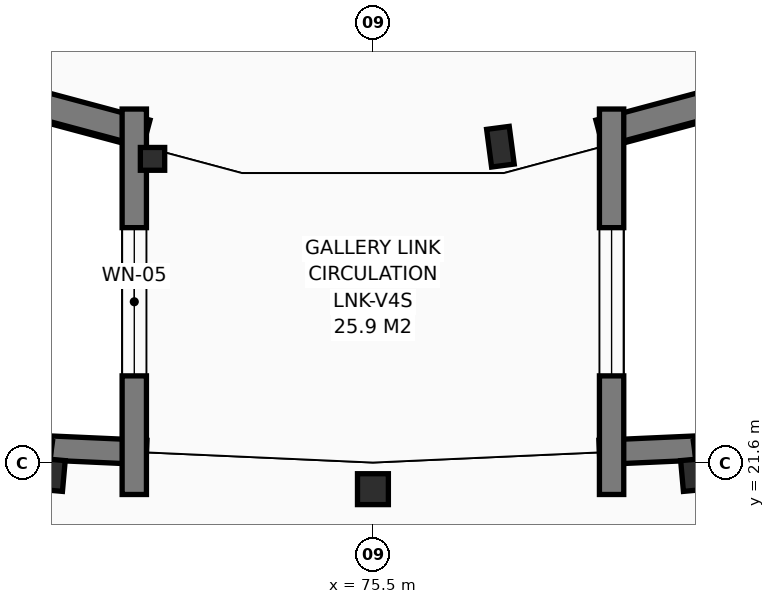
"""IFC4 building model, lengths in metres.
Left out: names, types, materials, properties, quantities, classifications, styles, units other than length and angle.
Written with IfcOpenShell. Run it as: python <this file> out.ifc"""

import sys

from ifc_helpers import new_model, si_unit, direction, frame, frame_2d, origin, origin_2d, place, context, subcontext, project, spatial, rectangle, hollow_circle, i_section, extrude, element, fill, save


model = new_model("IFC4")
c1 = context("Model", 3, precision=1e-05, world=origin(), true_north=direction((0.0, 1.0)))
c2 = subcontext(c1, "Body", "Model", "MODEL_VIEW")
j1 = project(units=[si_unit("LENGTHUNIT", "METRE"), si_unit("PLANEANGLEUNIT", "RADIAN")], contexts=[c1])
p1 = place(None, origin())
s1 = spatial("IfcSite", under=j1, at=p1, CompositionType="ELEMENT")
p2 = place(p1, origin())
s2 = spatial("IfcBuilding", under=s1, at=p2, CompositionType="ELEMENT")
p3 = place(p2, origin())
s3 = spatial("IfcBuildingStorey", under=s2, at=p3, CompositionType="ELEMENT", Elevation=0.0)
for number, where, z_axis, x_axis in (
    (1, (71.231, 21.446, 0.0), (0.0, 0.0, 1.0), (0.089, 0.996, 0.0)),
    (2, (75.5, 21.255, 0.0), (0.0, 0.0, 1.0), (0.0, 1.0, 0.0)),
    (3, (79.769, 21.446, 0.0), (0.0, 0.0, 1.0), (-0.089, 0.996, 0.0)),
):
    element("IfcColumn", number, at=place(p3, frame(where, z_axis=z_axis, x_axis=x_axis)), inside=s3, PredefinedType="COLUMN", context=c2, shape_type="SweptSolid", body=[
        extrude(hollow_circle(Radius=0.203, WallThickness=0.02, at=origin_2d()), origin(), (0.0, 0.0, 1.0), 5.1),
    ])
p4 = place(p3, frame((77.177, 25.76, 0.0), z_axis=(0.0, 0.0, 1.0), x_axis=(0.13052619222, -0.991444861374, 0.0)))
e4 = element("IfcColumn", 4, at=p4, inside=s3, PredefinedType="COLUMN", context=c2, shape_type="SweptSolid", body=[
    extrude(i_section(OverallWidth=0.3, OverallDepth=0.5, WebThickness=0.014, FlangeThickness=0.028, FilletRadius=0.027, at=origin_2d()), origin(), (0.0, 0.0, 1.0), 5.1),
])
p5 = place(p3, frame((72.6, 25.6, 0.0), z_axis=(0.0, 0.0, 1.0), x_axis=(1.0, 0.0, 0.0)))
e5 = element("IfcColumn", 5, at=p5, inside=s3, PredefinedType="COLUMN", context=c2, shape_type="SweptSolid", body=[
    extrude(i_section(OverallWidth=0.3, OverallDepth=0.32, WebThickness=0.011, FlangeThickness=0.021, FilletRadius=0.027, at=origin_2d()), origin(), (0.0, 0.0, 1.0), 5.1),
])
for number, where, z_axis, x_axis in (
    (6, (71.262, 21.794, 0.0), (0.0, 0.0, 1.0), (0.999, -0.045, 0.0)),
    (7, (78.48, 21.738, 0.0), (0.0, 0.0, 1.0), (0.999, 0.045, 0.0)),
):
    element("IfcWall", number, at=place(p3, frame(where, z_axis=z_axis, x_axis=x_axis)), inside=s3, PredefinedType="SOLIDWALL", context=c2, shape_type="SweptSolid", body=[
        extrude(rectangle(XDim=1.259, YDim=0.32, at=frame_2d((0.63, 0.0))), origin(), (0.0, 0.0, 1.0), 4.88),
    ])
p6 = place(p3, frame((80.656, 26.519, 0.0), z_axis=(0.0, 0.0, 1.0), x_axis=(-0.965924829222, -0.258822766178, 0.0)))
e8 = element("IfcWall", 8, at=p6, inside=s3, PredefinedType="SOLIDWALL", context=c2, shape_type="SweptSolid", body=[
    extrude(rectangle(XDim=2.252, YDim=0.36, at=frame_2d((1.126, 0.0))), origin(), (0.0, 0.0, 1.0), 4.88),
])
p7 = place(p3, frame((72.52, 25.936, 0.0), z_axis=(0.0, 0.0, 1.0), x_axis=(-0.965931226398, 0.25879889078, 0.0)))
e9 = element("IfcWall", 9, at=p7, inside=s3, PredefinedType="SOLIDWALL", context=c2, shape_type="SweptSolid", body=[
    extrude(rectangle(XDim=2.073, YDim=0.36, at=frame_2d((1.036, 0.0))), origin(), (0.0, 0.0, 1.0), 4.88),
])
p8 = place(p3, frame((72.36, 21.185, 0.0), z_axis=(0.0, 0.0, 1.0), x_axis=(0.0, 1.0, 0.0)))
e10 = element("IfcWall", 10, at=p8, inside=s3, PredefinedType="SOLIDWALL", context=c2, shape_type="SweptSolid", body=[
    extrude(rectangle(XDim=5.071, YDim=0.32, at=frame_2d((2.536, 0.0))), origin(), (0.0, 0.0, 1.0), 4.82),
])
p9 = place(p8, frame((1.561, 0.0, 1.12)))
e11 = element("IfcOpeningElement", 11, at=p9, cuts=e10, PredefinedType="OPENING", context=c2, shape_type="SweptSolid", body=[
    extrude(rectangle(XDim=1.95, YDim=1.5, at=frame_2d((0.975, 0.75))), frame((0.0, 0.17, 0.0), z_axis=(0.0, -1.0, 0.0), x_axis=(1.0, 0.0, 0.0)), (0.0, 0.0, 1.0), 0.34),
])
p10 = place(p3, frame((78.64, 26.256, 0.0), z_axis=(0.0, 0.0, 1.0), x_axis=(0.0, -1.0, 0.0)))
e12 = element("IfcWall", 12, at=p10, inside=s3, PredefinedType="SOLIDWALL", context=c2, shape_type="SweptSolid", body=[
    extrude(rectangle(XDim=5.071, YDim=0.32, at=frame_2d((2.536, 0.0))), origin(), (0.0, 0.0, 1.0), 4.82),
])
p11 = place(p10, frame((1.561, 0.0, 1.12)))
e13 = element("IfcOpeningElement", 13, at=p11, cuts=e12, PredefinedType="OPENING", context=c2, shape_type="SweptSolid", body=[
    extrude(rectangle(XDim=1.95, YDim=1.5, at=frame_2d((0.975, 0.75))), frame((0.0, 0.17, 0.0), z_axis=(0.0, -1.0, 0.0), x_axis=(1.0, 0.0, 0.0)), (0.0, 0.0, 1.0), 0.34),
])
p12 = place(p9, origin())
e14 = element("IfcWindow", 14, at=p12, inside=s3, PartitioningType="SINGLE_PANEL", PredefinedType="WINDOW", context=c2, shape_type="SweptSolid", body=[
    extrude(rectangle(XDim=1.95, YDim=1.5, at=frame_2d((0.975, 0.75))), frame((0.0, 0.03, 0.0), z_axis=(0.0, -1.0, 0.0), x_axis=(1.0, 0.0, 0.0)), (0.0, 0.0, 1.0), 0.06),
])
fill(e11, e14)
p13 = place(p11, origin())
e15 = element("IfcWindow", 15, at=p13, inside=s3, PartitioningType="SINGLE_PANEL", PredefinedType="WINDOW", context=c2, shape_type="SweptSolid", body=[
    extrude(rectangle(XDim=1.95, YDim=1.5, at=frame_2d((0.975, 0.75))), frame((0.0, 0.03, 0.0), z_axis=(0.0, -1.0, 0.0), x_axis=(1.0, 0.0, 0.0)), (0.0, 0.0, 1.0), 0.06),
])
fill(e13, e15)
save(model, sys.argv[1])
